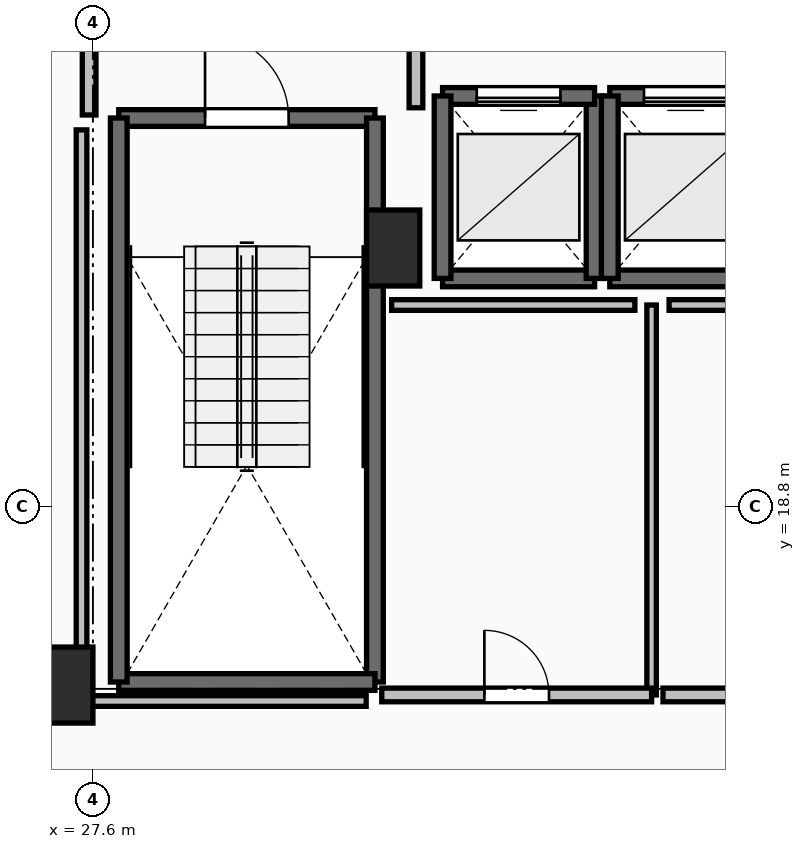
"""IFC4 building model, lengths in metres.
Left out: names, types, materials, properties, quantities, classifications, styles, units other than length and angle.
Written with IfcOpenShell. Run it as: python <this file> out.ifc"""

import sys

from ifc_helpers import new_model, si_unit, direction, frame, frame_2d, origin, origin_2d, place, context, subcontext, project, spatial, rectangle, extrude, element, fill, save


model = new_model("IFC4")
c1 = context("Model", 3, precision=1e-05, world=origin(), true_north=direction((0.0, 1.0)))
c2 = subcontext(c1, "Body", "Model", "MODEL_VIEW")
j1 = project(units=[si_unit("LENGTHUNIT", "METRE"), si_unit("PLANEANGLEUNIT", "RADIAN")], contexts=[c1])
p1 = place(None, origin())
s1 = spatial("IfcSite", under=j1, at=p1, CompositionType="ELEMENT")
p2 = place(p1, origin())
s2 = spatial("IfcBuilding", under=s1, at=p2, CompositionType="ELEMENT")
p3 = place(p2, frame((0.0, 0.0, 217.85)))
s3 = spatial("IfcBuildingStorey", under=s2, at=p3, CompositionType="ELEMENT", Elevation=217.85)
for number, where, z_axis, x_axis in (
    (1, (27.25, 16.45, 0.0), (0.0, 0.0, 1.0), (1.0, 0.0, 0.0)),
    (2, (31.55, 22.2, 0.0), (0.0, 0.0, 1.0), (1.0, 0.0, 0.0)),
):
    element("IfcColumn", number, at=place(p3, frame(where, z_axis=z_axis, x_axis=x_axis)), inside=s3, PredefinedType="PILASTER", context=c2, shape_type="SweptSolid", body=[
        extrude(rectangle(XDim=0.7, YDim=1.0, at=origin_2d()), origin(), (0.0, 0.0, 1.0), 3.55),
    ])
p4 = place(p3, frame((27.94, 23.91, 0.0), z_axis=(0.0, 0.0, 1.0), x_axis=(1.0, 0.0, 0.0)))
e3 = element("IfcWall", 3, at=p4, inside=s3, PredefinedType="SOLIDWALL", context=c2, shape_type="SweptSolid", body=[
    extrude(rectangle(XDim=3.37, YDim=0.22, at=frame_2d((1.685, 0.0))), origin(), (0.0, 0.0, 1.0), 3.29),
])
p5 = place(p4, frame((1.135, 0.0, 0.0)))
e4 = element("IfcOpeningElement", 4, at=p5, cuts=e3, PredefinedType="OPENING", context=c2, shape_type="SweptSolid", body=[
    extrude(rectangle(XDim=1.1, YDim=2.15, at=frame_2d((0.55, 1.075))), frame((0.0, 0.125, 0.0), z_axis=(0.0, -1.0, 0.0), x_axis=(1.0, 0.0, 0.0)), (0.0, 0.0, 1.0), 0.25),
])
p6 = place(p3, frame((31.31, 23.91, 0.0), z_axis=(0.0, 0.0, 1.0), x_axis=(0.0, -1.0, 0.0)))
e5 = element("IfcWall", 5, at=p6, inside=s3, PredefinedType="SOLIDWALL", context=c2, shape_type="SweptSolid", body=[
    extrude(rectangle(XDim=7.42, YDim=0.22, at=frame_2d((3.71, 0.0))), origin(), (0.0, 0.0, 1.0), 3.29),
])
p7 = place(p3, frame((31.31, 16.49, 0.0), z_axis=(0.0, 0.0, 1.0), x_axis=(-1.0, 0.0, 0.0)))
e6 = element("IfcWall", 6, at=p7, inside=s3, PredefinedType="SOLIDWALL", context=c2, shape_type="SweptSolid", body=[
    extrude(rectangle(XDim=3.37, YDim=0.22, at=frame_2d((1.685, 0.0))), origin(), (0.0, 0.0, 1.0), 3.29),
])
p8 = place(p3, frame((27.94, 16.49, 0.0), z_axis=(0.0, 0.0, 1.0), x_axis=(0.0, 1.0, 0.0)))
e7 = element("IfcWall", 7, at=p8, inside=s3, PredefinedType="SOLIDWALL", context=c2, shape_type="SweptSolid", body=[
    extrude(rectangle(XDim=7.42, YDim=0.22, at=frame_2d((3.71, 0.0))), origin(), (0.0, 0.0, 1.0), 3.29),
])
p9 = place(p3, frame((32.2, 21.8, 0.0), z_axis=(0.0, 0.0, 1.0), x_axis=(1.0, 0.0, 0.0)))
e8 = element("IfcWall", 8, at=p9, inside=s3, PredefinedType="SOLIDWALL", context=c2, shape_type="SweptSolid", body=[
    extrude(rectangle(XDim=2.0, YDim=0.22, at=frame_2d((1.0, 0.0))), origin(), (0.0, 0.0, 1.0), 3.29),
])
p10 = place(p3, frame((34.2, 21.8, 0.0), z_axis=(0.0, 0.0, 1.0), x_axis=(0.0, 1.0, 0.0)))
e9 = element("IfcWall", 9, at=p10, inside=s3, PredefinedType="SOLIDWALL", context=c2, shape_type="SweptSolid", body=[
    extrude(rectangle(XDim=2.4, YDim=0.22, at=frame_2d((1.2, 0.0))), origin(), (0.0, 0.0, 1.0), 3.29),
])
p11 = place(p3, frame((34.2, 24.2, 0.0), z_axis=(0.0, 0.0, 1.0), x_axis=(-1.0, 0.0, 0.0)))
e10 = element("IfcWall", 10, at=p11, inside=s3, PredefinedType="SOLIDWALL", context=c2, shape_type="SweptSolid", body=[
    extrude(rectangle(XDim=2.0, YDim=0.22, at=frame_2d((1.0, 0.0))), origin(), (0.0, 0.0, 1.0), 3.29),
])
p12 = place(p11, frame((0.45, 0.0, 0.0)))
e11 = element("IfcOpeningElement", 11, at=p12, cuts=e10, PredefinedType="OPENING", context=c2, shape_type="SweptSolid", body=[
    extrude(rectangle(XDim=1.1, YDim=2.2, at=frame_2d((0.55, 1.1))), frame((0.0, 0.125, 0.0), z_axis=(0.0, -1.0, 0.0), x_axis=(1.0, 0.0, 0.0)), (0.0, 0.0, 1.0), 0.25),
])
p13 = place(p3, frame((32.2, 24.2, 0.0), z_axis=(0.0, 0.0, 1.0), x_axis=(0.0, -1.0, 0.0)))
e12 = element("IfcWall", 12, at=p13, inside=s3, PredefinedType="SOLIDWALL", context=c2, shape_type="SweptSolid", body=[
    extrude(rectangle(XDim=2.4, YDim=0.22, at=frame_2d((1.2, 0.0))), origin(), (0.0, 0.0, 1.0), 3.29),
])
p14 = place(p3, frame((34.4, 21.8, 0.0), z_axis=(0.0, 0.0, 1.0), x_axis=(1.0, 0.0, 0.0)))
e13 = element("IfcWall", 13, at=p14, inside=s3, PredefinedType="SOLIDWALL", context=c2, shape_type="SweptSolid", body=[
    extrude(rectangle(XDim=2.0, YDim=0.22, at=frame_2d((1.0, 0.0))), origin(), (0.0, 0.0, 1.0), 3.29),
])
p15 = place(p3, frame((36.4, 24.2, 0.0), z_axis=(0.0, 0.0, 1.0), x_axis=(-1.0, 0.0, 0.0)))
e14 = element("IfcWall", 14, at=p15, inside=s3, PredefinedType="SOLIDWALL", context=c2, shape_type="SweptSolid", body=[
    extrude(rectangle(XDim=2.0, YDim=0.22, at=frame_2d((1.0, 0.0))), origin(), (0.0, 0.0, 1.0), 3.29),
])
p16 = place(p15, frame((0.45, 0.0, 0.0)))
e15 = element("IfcOpeningElement", 15, at=p16, cuts=e14, PredefinedType="OPENING", context=c2, shape_type="SweptSolid", body=[
    extrude(rectangle(XDim=1.1, YDim=2.2, at=frame_2d((0.55, 1.1))), frame((0.0, 0.125, 0.0), z_axis=(0.0, -1.0, 0.0), x_axis=(1.0, 0.0, 0.0)), (0.0, 0.0, 1.0), 0.25),
])
p17 = place(p3, frame((34.4, 24.2, 0.0), z_axis=(0.0, 0.0, 1.0), x_axis=(0.0, -1.0, 0.0)))
e16 = element("IfcWall", 16, at=p17, inside=s3, PredefinedType="SOLIDWALL", context=c2, shape_type="SweptSolid", body=[
    extrude(rectangle(XDim=2.4, YDim=0.22, at=frame_2d((1.2, 0.0))), origin(), (0.0, 0.0, 1.0), 3.29),
])
p18 = place(p3, frame((31.85, 24.045, 0.0), z_axis=(0.0, 0.0, 1.0), x_axis=(0.0, 1.0, 0.0)))
e17 = element("IfcWall", 17, at=p18, inside=s3, PredefinedType="PARTITIONING", context=c2, shape_type="SweptSolid", body=[
    extrude(rectangle(XDim=3.91, YDim=0.18, at=frame_2d((1.955, 0.0))), origin(), (0.0, 0.0, 1.0), 3.29),
])
p19 = place(p18, frame((1.355, 0.0, 0.0)))
e18 = element("IfcOpeningElement", 18, at=p19, cuts=e17, PredefinedType="OPENING", context=c2, shape_type="SweptSolid", body=[
    extrude(rectangle(XDim=1.2, YDim=2.15, at=frame_2d((0.6, 1.075))), frame((0.0, 0.105, 0.0), z_axis=(0.0, -1.0, 0.0), x_axis=(1.0, 0.0, 0.0)), (0.0, 0.0, 1.0), 0.21),
])
p20 = place(p3, frame((27.55, 28.0, 0.0), z_axis=(0.0, 0.0, 1.0), x_axis=(0.0, -1.0, 0.0)))
e19 = element("IfcWall", 19, at=p20, inside=s3, PredefinedType="PARTITIONING", context=c2, shape_type="SweptSolid", body=[
    extrude(rectangle(XDim=4.05, YDim=0.18, at=frame_2d((2.025, 0.0))), origin(), (0.0, 0.0, 1.0), 3.29),
])
p21 = place(p20, frame((1.425, 0.0, 0.0)))
e20 = element("IfcOpeningElement", 20, at=p21, cuts=e19, PredefinedType="OPENING", context=c2, shape_type="SweptSolid", body=[
    extrude(rectangle(XDim=1.2, YDim=2.15, at=frame_2d((0.6, 1.075))), frame((0.0, 0.105, 0.0), z_axis=(0.0, -1.0, 0.0), x_axis=(1.0, 0.0, 0.0)), (0.0, 0.0, 1.0), 0.21),
])
p22 = place(p3, frame((34.95, 16.32, 0.0), z_axis=(0.0, 0.0, 1.0), x_axis=(0.0, 1.0, 0.0)))
e21 = element("IfcWall", 21, at=p22, inside=s3, PredefinedType="PARTITIONING", context=c2, shape_type="SweptSolid", body=[
    extrude(rectangle(XDim=5.13, YDim=0.125, at=frame_2d((2.565, 0.0))), origin(), (0.0, 0.0, 1.0), 3.29),
])
p23 = place(p3, frame((31.4, 16.32, 0.0), z_axis=(0.0, 0.0, 1.0), x_axis=(1.0, 0.0, 0.0)))
e22 = element("IfcWall", 22, at=p23, inside=s3, PredefinedType="PARTITIONING", context=c2, shape_type="SweptSolid", body=[
    extrude(rectangle(XDim=3.55, YDim=0.18, at=frame_2d((1.775, 0.0))), origin(), (0.0, 0.0, 1.0), 3.29),
])
p24 = place(p23, frame((1.35, 0.0, 0.0)))
e23 = element("IfcOpeningElement", 23, at=p24, cuts=e22, PredefinedType="OPENING", context=c2, shape_type="SweptSolid", body=[
    extrude(rectangle(XDim=0.85, YDim=2.1, at=frame_2d((0.425, 1.05))), frame((0.0, 0.105, 0.0), z_axis=(0.0, -1.0, 0.0), x_axis=(1.0, 0.0, 0.0)), (0.0, 0.0, 1.0), 0.21),
])
p25 = place(p3, frame((35.1, 16.32, 0.0), z_axis=(0.0, 0.0, 1.0), x_axis=(1.0, 0.0, 0.0)))
e24 = element("IfcWall", 24, at=p25, inside=s3, PredefinedType="PARTITIONING", context=c2, shape_type="SweptSolid", body=[
    extrude(rectangle(XDim=3.7, YDim=0.18, at=frame_2d((1.85, 0.0))), origin(), (0.0, 0.0, 1.0), 3.29),
])
p26 = place(p25, frame((1.35, 0.0, 0.0)))
e25 = element("IfcOpeningElement", 25, at=p26, cuts=e24, PredefinedType="OPENING", context=c2, shape_type="SweptSolid", body=[
    extrude(rectangle(XDim=1.0, YDim=2.15, at=frame_2d((0.5, 1.075))), frame((0.0, 0.105, 0.0), z_axis=(0.0, -1.0, 0.0), x_axis=(1.0, 0.0, 0.0)), (0.0, 0.0, 1.0), 0.21),
])
p27 = place(p3, frame((34.73, 21.45, 0.0), z_axis=(0.0, 0.0, 1.0), x_axis=(-1.0, 0.0, 0.0)))
e26 = element("IfcWall", 26, at=p27, inside=s3, PredefinedType="PARTITIONING", context=c2, shape_type="SweptSolid", body=[
    extrude(rectangle(XDim=3.2, YDim=0.14, at=frame_2d((1.6, 0.0))), origin(), (0.0, 0.0, 1.0), 3.29),
])
p28 = place(p3, frame((36.439, 21.45, 0.0), z_axis=(0.0, 0.0, 1.0), x_axis=(-1.0, 0.0, 0.0)))
e27 = element("IfcWall", 27, at=p28, inside=s3, PredefinedType="PARTITIONING", context=c2, shape_type="SweptSolid", body=[
    extrude(rectangle(XDim=1.259, YDim=0.14, at=frame_2d((0.629, 0.0))), origin(), (0.0, 0.0, 1.0), 3.29),
])
p29 = place(p3, frame((27.45, 23.754, 0.0), z_axis=(0.0, 0.0, 1.0), x_axis=(0.0, -1.0, 0.0)))
e28 = element("IfcWall", 28, at=p29, inside=s3, PredefinedType="PARTITIONING", context=c2, shape_type="SweptSolid", body=[
    extrude(rectangle(XDim=7.514, YDim=0.14, at=frame_2d((3.757, 0.0))), origin(), (0.0, 0.0, 1.0), 2.482),
])
p30 = place(p3, frame((27.45, 16.24, 0.0), z_axis=(0.0, 0.0, 1.0), x_axis=(1.0, 0.0, 0.0)))
e29 = element("IfcWall", 29, at=p30, inside=s3, PredefinedType="PARTITIONING", context=c2, shape_type="SweptSolid", body=[
    extrude(rectangle(XDim=3.745, YDim=0.14, at=frame_2d((1.873, 0.0))), origin(), (0.0, 0.0, 1.0), 2.482),
])
p31 = place(p5, origin())
e30 = element("IfcDoor", 30, at=p31, inside=s3, OperationType="SINGLE_SWING_LEFT", PredefinedType="DOOR", context=c2, shape_type="SweptSolid", body=[
    extrude(rectangle(XDim=1.1, YDim=2.15, at=frame_2d((0.55, 1.075))), frame((0.0, 0.025, 0.0), z_axis=(0.0, -1.0, 0.0), x_axis=(1.0, 0.0, 0.0)), (0.0, 0.0, 1.0), 0.05),
])
fill(e4, e30)
p32 = place(p12, origin())
e31 = element("IfcDoor", 31, at=p32, inside=s3, OperationType="SLIDING_TO_LEFT", PredefinedType="DOOR", context=c2, shape_type="SweptSolid", body=[
    extrude(rectangle(XDim=1.1, YDim=2.2, at=frame_2d((0.55, 1.1))), frame((0.0, 0.025, 0.0), z_axis=(0.0, -1.0, 0.0), x_axis=(1.0, 0.0, 0.0)), (0.0, 0.0, 1.0), 0.05),
])
fill(e11, e31)
p33 = place(p16, origin())
e32 = element("IfcDoor", 32, at=p33, inside=s3, OperationType="SLIDING_TO_LEFT", PredefinedType="DOOR", context=c2, shape_type="SweptSolid", body=[
    extrude(rectangle(XDim=1.1, YDim=2.2, at=frame_2d((0.55, 1.1))), frame((0.0, 0.025, 0.0), z_axis=(0.0, -1.0, 0.0), x_axis=(1.0, 0.0, 0.0)), (0.0, 0.0, 1.0), 0.05),
])
fill(e15, e32)
p34 = place(p24, origin())
e33 = element("IfcDoor", 33, at=p34, inside=s3, OperationType="SINGLE_SWING_LEFT", PredefinedType="DOOR", context=c2, shape_type="SweptSolid", body=[
    extrude(rectangle(XDim=0.85, YDim=2.1, at=frame_2d((0.425, 1.05))), frame((0.0, 0.025, 0.0), z_axis=(0.0, -1.0, 0.0), x_axis=(1.0, 0.0, 0.0)), (0.0, 0.0, 1.0), 0.05),
])
fill(e23, e33)
save(model, sys.argv[1])
